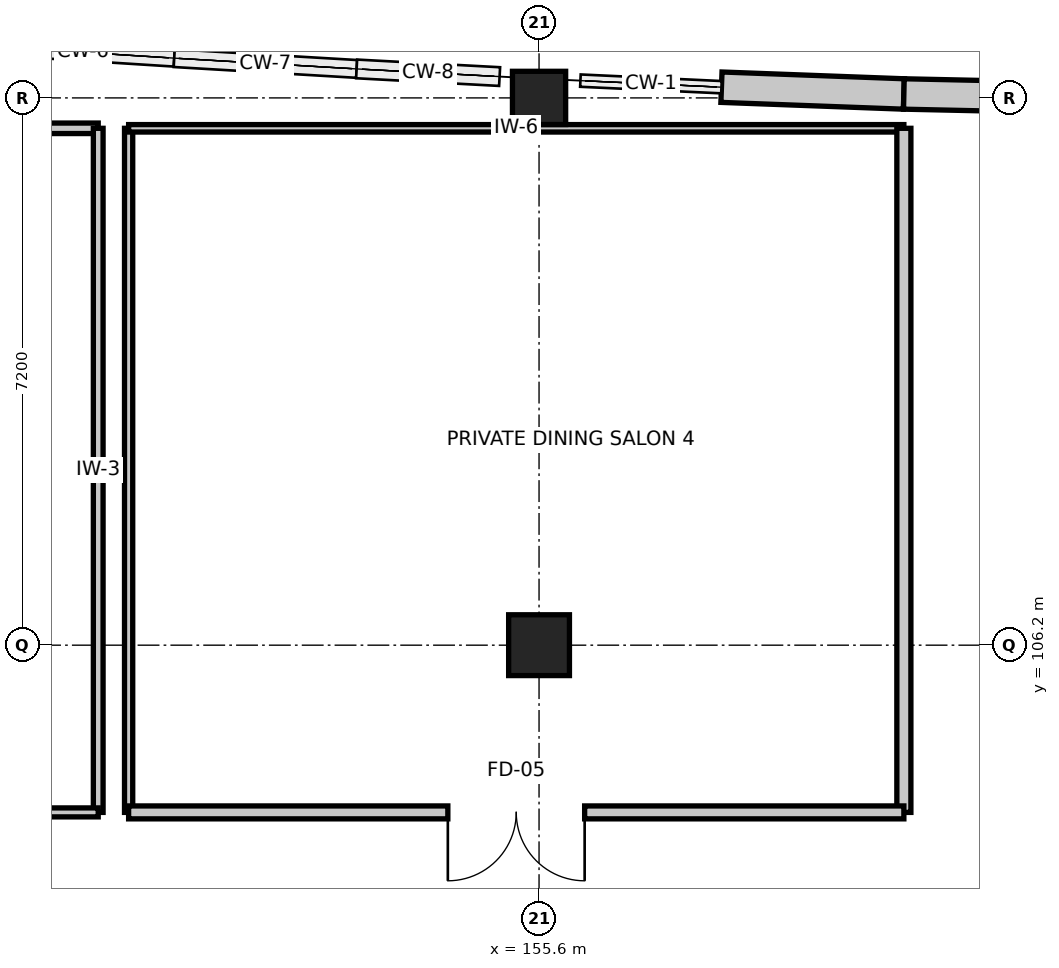
"""IFC4 building model, lengths in metres.
Left out: names, types, materials, properties, quantities, classifications, styles, units other than length and angle.
Written with IfcOpenShell. Run it as: python <this file> out.ifc"""

import sys

from ifc_helpers import new_model, si_unit, direction, frame, frame_2d, origin, origin_2d, place, context, subcontext, project, spatial, rectangle, extrude, element, fill, save


model = new_model("IFC4")
c1 = context("Model", 3, precision=1e-05, world=origin(), true_north=direction((0.0, 1.0)))
c2 = subcontext(c1, "Body", "Model", "MODEL_VIEW")
j1 = project(units=[si_unit("LENGTHUNIT", "METRE"), si_unit("PLANEANGLEUNIT", "RADIAN")], contexts=[c1])
p1 = place(None, origin())
s1 = spatial("IfcSite", under=j1, at=p1, CompositionType="ELEMENT")
p2 = place(p1, origin())
s2 = spatial("IfcBuilding", under=s1, at=p2, CompositionType="ELEMENT")
p3 = place(p2, frame((0.0, 0.0, 5.4)))
s3 = spatial("IfcBuildingStorey", under=s2, at=p3, CompositionType="ELEMENT", Elevation=5.4)
p4 = place(p3, frame((155.6, 106.2, 0.0), z_axis=(0.0, 0.0, 1.0), x_axis=(1.0, 0.0, 0.0)))
e1 = element("IfcColumn", 1, at=p4, inside=s3, PredefinedType="COLUMN", context=c2, shape_type="SweptSolid", body=[
    extrude(rectangle(XDim=0.8, YDim=0.8, at=origin_2d()), origin(), (0.0, 0.0, 1.0), 5.1),
])
p5 = place(p3, frame((155.6, 113.4, 0.0), z_axis=(0.0, 0.0, 1.0), x_axis=(1.0, 0.0, 0.0)))
e2 = element("IfcColumn", 2, at=p5, inside=s3, PredefinedType="COLUMN", context=c2, shape_type="SweptSolid", body=[
    extrude(rectangle(XDim=0.7, YDim=0.7, at=origin_2d()), origin(), (0.0, 0.0, 1.0), 5.1),
])
p6 = place(p3, frame((158.0, 113.541, 0.0), z_axis=(0.0, 0.0, 1.0), x_axis=(0.99930757318, -0.037207179225, 0.0)))
e3 = element("IfcWall", 3, at=p6, inside=s3, PredefinedType="STANDARD", context=c2, shape_type="SweptSolid", body=[
    extrude(rectangle(XDim=2.402, YDim=0.4, at=frame_2d((1.201, 0.0))), origin(), (0.0, 0.0, 1.0), 4.015),
])
p7 = place(p3, frame((160.4, 113.452, 0.0), z_axis=(0.0, 0.0, 1.0), x_axis=(0.999767568547, -0.021559426766, 0.0)))
e4 = element("IfcWall", 4, at=p7, inside=s3, PredefinedType="STANDARD", context=c2, shape_type="SweptSolid", body=[
    extrude(rectangle(XDim=2.401, YDim=0.4, at=frame_2d((1.2, 0.0))), origin(), (0.0, 0.0, 1.0), 4.015),
])
p8 = place(p3, frame((139.6, 113.0, 0.0), z_axis=(0.0, 0.0, 1.0), x_axis=(1.0, 0.0, 0.0)))
e5 = element("IfcWall", 5, at=p8, inside=s3, PredefinedType="PARTITIONING", context=c2, shape_type="SweptSolid", body=[
    extrude(rectangle(XDim=10.2, YDim=0.138, at=frame_2d((5.1, 0.0))), origin(), (0.0, 0.0, 1.0), 4.115),
])
p9 = place(p3, frame((149.8, 113.0, 0.0), z_axis=(0.0, 0.0, 1.0), x_axis=(0.0, -1.0, 0.0)))
e6 = element("IfcWall", 6, at=p9, inside=s3, PredefinedType="PARTITIONING", context=c2, shape_type="SweptSolid", body=[
    extrude(rectangle(XDim=9.0, YDim=0.128, at=frame_2d((4.5, 0.0))), origin(), (0.0, 0.0, 1.0), 4.015),
])
p10 = place(p3, frame((149.8, 104.0, 0.0), z_axis=(0.0, 0.0, 1.0), x_axis=(-1.0, 0.0, 0.0)))
e7 = element("IfcWall", 7, at=p10, inside=s3, PredefinedType="PARTITIONING", context=c2, shape_type="SweptSolid", body=[
    extrude(rectangle(XDim=10.2, YDim=0.118, at=frame_2d((5.1, 0.0))), origin(), (0.0, 0.0, 1.0), 4.115),
])
p11 = place(p10, frame((4.3, 0.0, 0.0)))
e8 = element("IfcOpeningElement", 8, at=p11, cuts=e7, PredefinedType="OPENING", context=c2, shape_type="SweptSolid", body=[
    extrude(rectangle(XDim=1.6, YDim=2.15, at=frame_2d((0.8, 1.075))), frame((0.0, 0.069, 0.0), z_axis=(0.0, -1.0, 0.0), x_axis=(1.0, 0.0, 0.0)), (0.0, 0.0, 1.0), 0.138),
])
p12 = place(p3, frame((150.2, 104.0, 0.0), z_axis=(0.0, 0.0, 1.0), x_axis=(0.0, 1.0, 0.0)))
e9 = element("IfcWall", 9, at=p12, inside=s3, PredefinedType="PARTITIONING", context=c2, shape_type="SweptSolid", body=[
    extrude(rectangle(XDim=9.0, YDim=0.108, at=frame_2d((4.5, 0.0))), origin(), (0.0, 0.0, 1.0), 4.015),
])
p13 = place(p3, frame((150.2, 113.0, 0.0), z_axis=(0.0, 0.0, 1.0), x_axis=(1.0, 0.0, 0.0)))
e10 = element("IfcWall", 10, at=p13, inside=s3, PredefinedType="PARTITIONING", context=c2, shape_type="SweptSolid", body=[
    extrude(rectangle(XDim=10.2, YDim=0.098, at=frame_2d((5.1, 0.0))), origin(), (0.0, 0.0, 1.0), 4.115),
])
p14 = place(p3, frame((160.4, 113.0, 0.0), z_axis=(0.0, 0.0, 1.0), x_axis=(0.0, -1.0, 0.0)))
e11 = element("IfcWall", 11, at=p14, inside=s3, PredefinedType="PARTITIONING", context=c2, shape_type="SweptSolid", body=[
    extrude(rectangle(XDim=9.0, YDim=0.185, at=frame_2d((4.5, 0.0))), origin(), (0.0, 0.0, 1.0), 4.015),
])
p15 = place(p3, frame((160.4, 104.0, 0.0), z_axis=(0.0, 0.0, 1.0), x_axis=(-1.0, 0.0, 0.0)))
e12 = element("IfcWall", 12, at=p15, inside=s3, PredefinedType="PARTITIONING", context=c2, shape_type="SweptSolid", body=[
    extrude(rectangle(XDim=10.2, YDim=0.17, at=frame_2d((5.1, 0.0))), origin(), (0.0, 0.0, 1.0), 4.115),
])
p16 = place(p15, frame((4.2, 0.0, 0.0)))
e13 = element("IfcOpeningElement", 13, at=p16, cuts=e12, PredefinedType="OPENING", context=c2, shape_type="SweptSolid", body=[
    extrude(rectangle(XDim=1.8, YDim=2.2, at=frame_2d((0.9, 1.1))), frame((0.0, 0.095, 0.0), z_axis=(0.0, -1.0, 0.0), x_axis=(1.0, 0.0, 0.0)), (0.0, 0.0, 1.0), 0.19),
])
p17 = place(p16, origin())
e14 = element("IfcDoor", 14, at=p17, inside=s3, OperationType="DOUBLE_DOOR_SINGLE_SWING", PredefinedType="DOOR", context=c2, shape_type="SweptSolid", body=[
    extrude(rectangle(XDim=1.8, YDim=2.2, at=frame_2d((0.9, 1.1))), frame((0.0, 0.025, 0.0), z_axis=(0.0, -1.0, 0.0), x_axis=(1.0, 0.0, 0.0)), (0.0, 0.0, 1.0), 0.05),
])
fill(e13, e14)
save(model, sys.argv[1])
